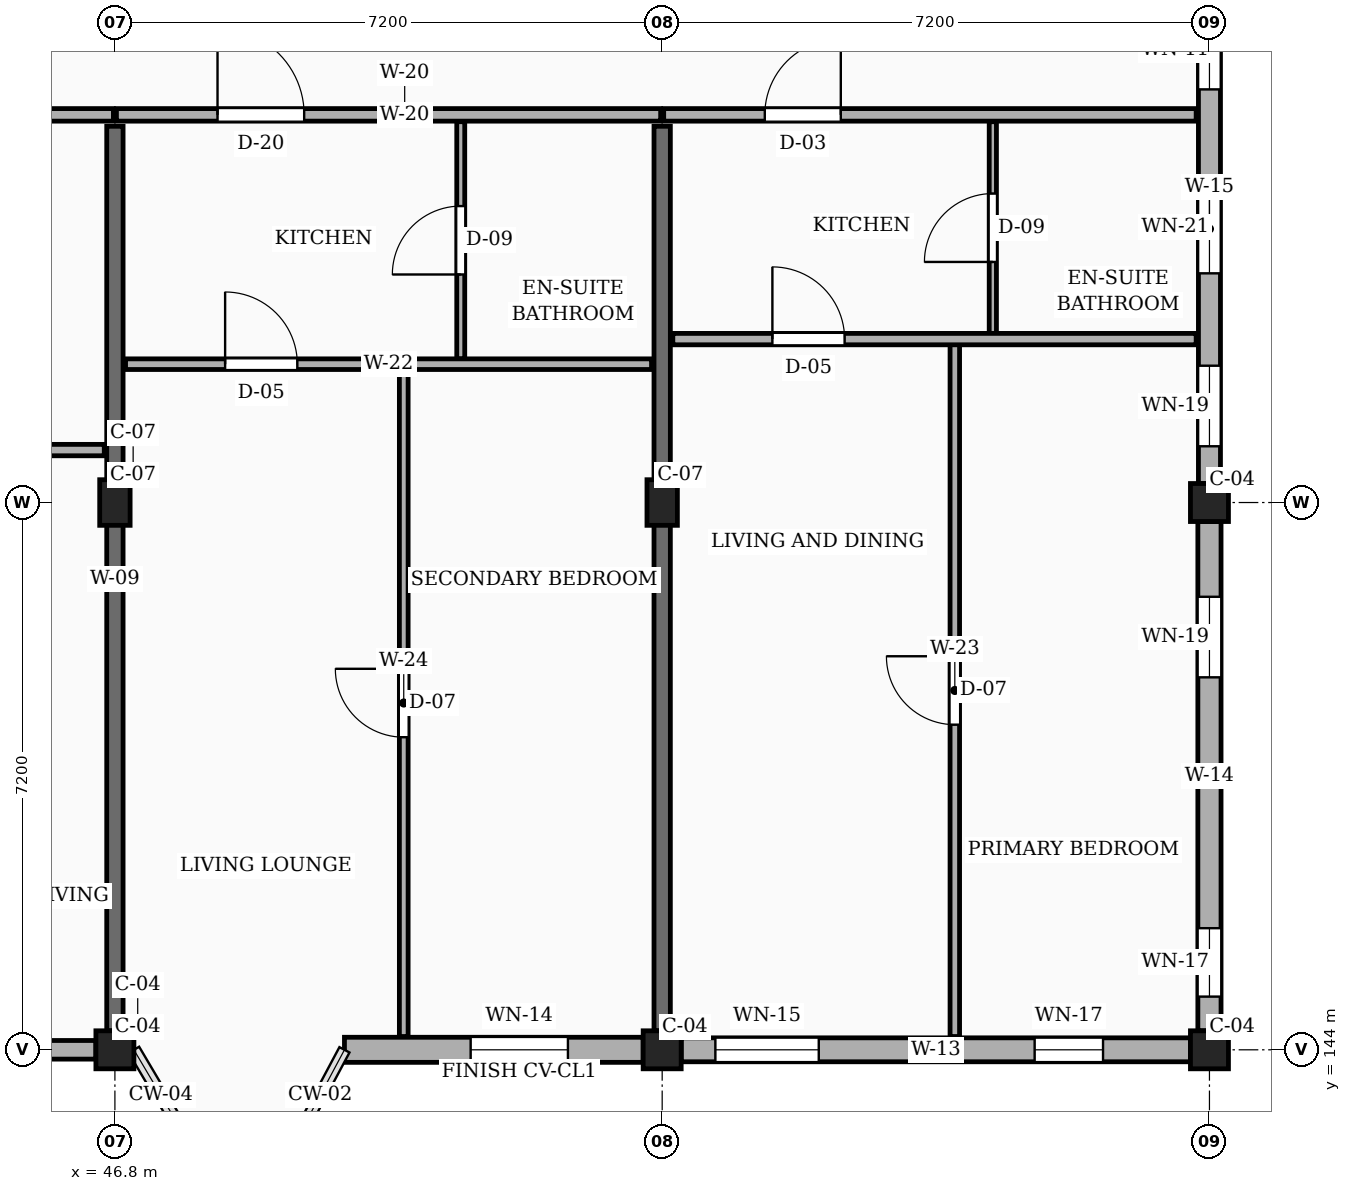
"""IFC4 building model, lengths in metres.
Left out: names, types, materials, properties, quantities, classifications, styles, units other than length and angle.
Written with IfcOpenShell. Run it as: python <this file> out.ifc"""

import sys

from ifc_helpers import new_model, si_unit, direction, frame, frame_2d, origin, origin_2d, place, context, subcontext, project, spatial, rectangle, extrude, element, fill, save


model = new_model("IFC4")
c1 = context("Model", 3, precision=1e-05, world=origin(), true_north=direction((0.0, 1.0)))
c2 = subcontext(c1, "Body", "Model", "MODEL_VIEW")
j1 = project(units=[si_unit("LENGTHUNIT", "METRE"), si_unit("PLANEANGLEUNIT", "RADIAN")], contexts=[c1])
p1 = place(None, origin())
s1 = spatial("IfcSite", under=j1, at=p1, CompositionType="ELEMENT")
p2 = place(p1, origin())
s2 = spatial("IfcBuilding", under=s1, at=p2, CompositionType="ELEMENT")
p3 = place(p2, frame((0.0, 0.0, 29.7)))
s3 = spatial("IfcBuildingStorey", under=s2, at=p3, CompositionType="ELEMENT", Elevation=29.7)
p4 = place(p3, frame((46.8, 144.0, 0.0), z_axis=(0.0, 0.0, 1.0), x_axis=(1.0, 0.0, 0.0)))
e1 = element("IfcColumn", 1, at=p4, inside=s3, PredefinedType="COLUMN", context=c2, shape_type="SweptSolid", body=[
    extrude(rectangle(XDim=0.5, YDim=0.5, at=origin_2d()), origin(), (0.0, 0.0, 1.0), 3.15),
])
p5 = place(p3, frame((46.8, 151.2, 0.0), z_axis=(0.0, 0.0, 1.0), x_axis=(1.0, 0.0, 0.0)))
e2 = element("IfcColumn", 2, at=p5, inside=s3, PredefinedType="COLUMN", context=c2, shape_type="SweptSolid", body=[
    extrude(rectangle(XDim=0.4, YDim=0.6, at=origin_2d()), origin(), (0.0, 0.0, 1.0), 3.15),
])
p6 = place(p3, frame((54.0, 144.0, 0.0), z_axis=(0.0, 0.0, 1.0), x_axis=(1.0, 0.0, 0.0)))
e3 = element("IfcColumn", 3, at=p6, inside=s3, PredefinedType="COLUMN", context=c2, shape_type="SweptSolid", body=[
    extrude(rectangle(XDim=0.5, YDim=0.5, at=origin_2d()), origin(), (0.0, 0.0, 1.0), 3.15),
])
p7 = place(p3, frame((54.0, 151.2, 0.0), z_axis=(0.0, 0.0, 1.0), x_axis=(1.0, 0.0, 0.0)))
e4 = element("IfcColumn", 4, at=p7, inside=s3, PredefinedType="COLUMN", context=c2, shape_type="SweptSolid", body=[
    extrude(rectangle(XDim=0.4, YDim=0.6, at=origin_2d()), origin(), (0.0, 0.0, 1.0), 3.15),
])
for number, where, z_axis, x_axis in (
    (5, (61.2, 144.0, 0.0), (0.0, 0.0, 1.0), (1.0, 0.0, 0.0)),
    (6, (61.2, 151.2, 0.0), (0.0, 0.0, 1.0), (1.0, 0.0, 0.0)),
):
    element("IfcColumn", number, at=place(p3, frame(where, z_axis=z_axis, x_axis=x_axis)), inside=s3, PredefinedType="COLUMN", context=c2, shape_type="SweptSolid", body=[
        extrude(rectangle(XDim=0.5, YDim=0.5, at=origin_2d()), origin(), (0.0, 0.0, 1.0), 3.15),
    ])
for number, where, z_axis, x_axis in (
    (7, (46.8, 144.25, 0.0), (0.0, 0.0, 1.0), (0.0, 1.0, 0.0)),
    (8, (54.0, 144.25, 0.0), (0.0, 0.0, 1.0), (0.0, 1.0, 0.0)),
):
    element("IfcWall", number, at=place(p3, frame(where, z_axis=z_axis, x_axis=x_axis)), inside=s3, PredefinedType="SOLIDWALL", context=c2, shape_type="SweptSolid", body=[
        extrude(rectangle(XDim=11.9, YDim=0.215, at=frame_2d((5.95, 0.0))), origin(), (0.0, 0.0, 1.0), 2.185),
    ])
p8 = place(p3, frame((39.85, 144.0, 0.0), z_axis=(0.0, 0.0, 1.0), x_axis=(1.0, 0.0, 0.0)))
e9 = element("IfcWall", 9, at=p8, inside=s3, PredefinedType="SOLIDWALL", context=c2, shape_type="SweptSolid", body=[
    extrude(rectangle(XDim=6.7, YDim=0.245, at=frame_2d((3.35, 0.0))), origin(), (0.0, 0.0, 1.0), 2.455),
])
p9 = place(p8, frame((0.45, 0.0, 0.78)))
e10 = element("IfcOpeningElement", 10, at=p9, cuts=e9, PredefinedType="OPENING", context=c2, shape_type="SweptSolid", body=[
    extrude(rectangle(XDim=1.12, YDim=1.26, at=frame_2d((0.56, 0.63))), frame((0.0, 0.133, 0.0), z_axis=(0.0, -1.0, 0.0), x_axis=(1.0, 0.0, 0.0)), (0.0, 0.0, 1.0), 0.265),
])
p10 = place(p8, frame((4.65, 0.0, 0.78)))
e11 = element("IfcOpeningElement", 11, at=p10, cuts=e9, PredefinedType="OPENING", context=c2, shape_type="SweptSolid", body=[
    extrude(rectangle(XDim=1.28, YDim=1.26, at=frame_2d((0.64, 0.63))), frame((0.0, 0.133, 0.0), z_axis=(0.0, -1.0, 0.0), x_axis=(1.0, 0.0, 0.0)), (0.0, 0.0, 1.0), 0.265),
])
p11 = place(p3, frame((49.82, 144.0, 0.0), z_axis=(0.0, 0.0, 1.0), x_axis=(1.0, 0.0, 0.0)))
e12 = element("IfcWall", 12, at=p11, inside=s3, PredefinedType="SOLIDWALL", context=c2, shape_type="SweptSolid", body=[
    extrude(rectangle(XDim=3.93, YDim=0.33, at=frame_2d((1.965, 0.0))), origin(), (0.0, 0.0, 1.0), 2.455),
])
p12 = place(p11, frame((1.66, 0.0, 0.78)))
e13 = element("IfcOpeningElement", 13, at=p12, cuts=e12, PredefinedType="OPENING", context=c2, shape_type="SweptSolid", body=[
    extrude(rectangle(XDim=1.28, YDim=1.26, at=frame_2d((0.64, 0.63))), frame((0.0, 0.175, 0.0), z_axis=(0.0, -1.0, 0.0), x_axis=(1.0, 0.0, 0.0)), (0.0, 0.0, 1.0), 0.35),
])
p13 = place(p3, frame((54.25, 144.0, 0.0), z_axis=(0.0, 0.0, 1.0), x_axis=(1.0, 0.0, 0.0)))
e14 = element("IfcWall", 14, at=p13, inside=s3, PredefinedType="SOLIDWALL", context=c2, shape_type="SweptSolid", body=[
    extrude(rectangle(XDim=6.7, YDim=0.315, at=frame_2d((3.35, 0.0))), origin(), (0.0, 0.0, 1.0), 2.455),
])
p14 = place(p13, frame((0.45, 0.0, 0.78)))
e15 = element("IfcOpeningElement", 15, at=p14, cuts=e14, PredefinedType="OPENING", context=c2, shape_type="SweptSolid", body=[
    extrude(rectangle(XDim=1.36, YDim=1.26, at=frame_2d((0.68, 0.63))), frame((0.0, 0.167, 0.0), z_axis=(0.0, -1.0, 0.0), x_axis=(1.0, 0.0, 0.0)), (0.0, 0.0, 1.0), 0.335),
])
p15 = place(p13, frame((4.65, 0.0, 0.78)))
e16 = element("IfcOpeningElement", 16, at=p15, cuts=e14, PredefinedType="OPENING", context=c2, shape_type="SweptSolid", body=[
    extrude(rectangle(XDim=0.9, YDim=1.36, at=frame_2d((0.45, 0.68))), frame((0.0, 0.167, 0.0), z_axis=(0.0, -1.0, 0.0), x_axis=(1.0, 0.0, 0.0)), (0.0, 0.0, 1.0), 0.335),
])
p16 = place(p3, frame((61.2, 144.25, 0.0), z_axis=(0.0, 0.0, 1.0), x_axis=(0.0, 1.0, 0.0)))
e17 = element("IfcWall", 17, at=p16, inside=s3, PredefinedType="SOLIDWALL", context=c2, shape_type="SweptSolid", body=[
    extrude(rectangle(XDim=6.7, YDim=0.305, at=frame_2d((3.35, 0.0))), origin(), (0.0, 0.0, 1.0), 2.455),
])
p17 = place(p16, frame((0.45, 0.0, 0.78)))
e18 = element("IfcOpeningElement", 18, at=p17, cuts=e17, PredefinedType="OPENING", context=c2, shape_type="SweptSolid", body=[
    extrude(rectangle(XDim=0.9, YDim=1.36, at=frame_2d((0.45, 0.68))), frame((0.0, 0.163, 0.0), z_axis=(0.0, -1.0, 0.0), x_axis=(1.0, 0.0, 0.0)), (0.0, 0.0, 1.0), 0.325),
])
p18 = place(p16, frame((4.65, 0.0, 0.78)))
e19 = element("IfcOpeningElement", 19, at=p18, cuts=e17, PredefinedType="OPENING", context=c2, shape_type="SweptSolid", body=[
    extrude(rectangle(XDim=1.06, YDim=1.36, at=frame_2d((0.53, 0.68))), frame((0.0, 0.163, 0.0), z_axis=(0.0, -1.0, 0.0), x_axis=(1.0, 0.0, 0.0)), (0.0, 0.0, 1.0), 0.325),
])
p19 = place(p3, frame((61.2, 151.45, 0.0), z_axis=(0.0, 0.0, 1.0), x_axis=(0.0, 1.0, 0.0)))
e20 = element("IfcWall", 20, at=p19, inside=s3, PredefinedType="SOLIDWALL", context=c2, shape_type="SweptSolid", body=[
    extrude(rectangle(XDim=6.7, YDim=0.29, at=frame_2d((3.35, 0.0))), origin(), (0.0, 0.0, 1.0), 2.455),
])
p20 = place(p19, frame((0.49, 0.0, 0.78)))
e21 = element("IfcOpeningElement", 21, at=p20, cuts=e20, PredefinedType="OPENING", context=c2, shape_type="SweptSolid", body=[
    extrude(rectangle(XDim=1.06, YDim=1.36, at=frame_2d((0.53, 0.68))), frame((0.0, 0.155, 0.0), z_axis=(0.0, -1.0, 0.0), x_axis=(1.0, 0.0, 0.0)), (0.0, 0.0, 1.0), 0.31),
])
p21 = place(p19, frame((2.765, 0.0, 0.78)))
e22 = element("IfcOpeningElement", 22, at=p21, cuts=e20, PredefinedType="OPENING", context=c2, shape_type="SweptSolid", body=[
    extrude(rectangle(XDim=1.22, YDim=1.36, at=frame_2d((0.61, 0.68))), frame((0.0, 0.155, 0.0), z_axis=(0.0, -1.0, 0.0), x_axis=(1.0, 0.0, 0.0)), (0.0, 0.0, 1.0), 0.31),
])
p22 = place(p19, frame((5.185, 0.0, 0.78)))
e23 = element("IfcOpeningElement", 23, at=p22, cuts=e20, PredefinedType="OPENING", context=c2, shape_type="SweptSolid", body=[
    extrude(rectangle(XDim=1.04, YDim=1.26, at=frame_2d((0.52, 0.63))), frame((0.0, 0.155, 0.0), z_axis=(0.0, -1.0, 0.0), x_axis=(1.0, 0.0, 0.0)), (0.0, 0.0, 1.0), 0.31),
])
p23 = place(p3, frame((39.62, 156.3, 0.0), z_axis=(0.0, 0.0, 1.0), x_axis=(1.0, 0.0, 0.0)))
e24 = element("IfcWall", 24, at=p23, inside=s3, PredefinedType="PARTITIONING", context=c2, shape_type="SweptSolid", body=[
    extrude(rectangle(XDim=7.16, YDim=0.165, at=frame_2d((3.58, 0.0))), origin(), (0.0, 0.0, 1.0), 2.32),
])
p24 = place(p23, frame((4.78, 0.0, 0.0)))
e25 = element("IfcOpeningElement", 25, at=p24, cuts=e24, PredefinedType="OPENING", context=c2, shape_type="SweptSolid", body=[
    extrude(rectangle(XDim=0.94, YDim=2.12, at=frame_2d((0.47, 1.06))), frame((0.0, 0.093, 0.0), z_axis=(0.0, -1.0, 0.0), x_axis=(1.0, 0.0, 0.0)), (0.0, 0.0, 1.0), 0.185),
])
p25 = place(p3, frame((46.82, 156.3, 0.0), z_axis=(0.0, 0.0, 1.0), x_axis=(1.0, 0.0, 0.0)))
e26 = element("IfcWall", 26, at=p25, inside=s3, PredefinedType="PARTITIONING", context=c2, shape_type="SweptSolid", body=[
    extrude(rectangle(XDim=7.16, YDim=0.165, at=frame_2d((3.58, 0.0))), origin(), (0.0, 0.0, 1.0), 2.32),
])
p26 = place(p25, frame((1.33, 0.0, 0.0)))
e27 = element("IfcOpeningElement", 27, at=p26, cuts=e26, PredefinedType="OPENING", context=c2, shape_type="SweptSolid", body=[
    extrude(rectangle(XDim=1.14, YDim=2.18, at=frame_2d((0.57, 1.09))), frame((0.0, 0.093, 0.0), z_axis=(0.0, -1.0, 0.0), x_axis=(1.0, 0.0, 0.0)), (0.0, 0.0, 1.0), 0.185),
])
p27 = place(p3, frame((54.02, 156.3, 0.0), z_axis=(0.0, 0.0, 1.0), x_axis=(1.0, 0.0, 0.0)))
e28 = element("IfcWall", 28, at=p27, inside=s3, PredefinedType="PARTITIONING", context=c2, shape_type="SweptSolid", body=[
    extrude(rectangle(XDim=7.005, YDim=0.165, at=frame_2d((3.502, 0.0))), origin(), (0.0, 0.0, 1.0), 2.32),
])
p28 = place(p27, frame((1.33, 0.0, 0.0)))
e29 = element("IfcOpeningElement", 29, at=p28, cuts=e28, PredefinedType="OPENING", context=c2, shape_type="SweptSolid", body=[
    extrude(rectangle(XDim=1.0, YDim=2.15, at=frame_2d((0.5, 1.075))), frame((0.0, 0.093, 0.0), z_axis=(0.0, -1.0, 0.0), x_axis=(1.0, 0.0, 0.0)), (0.0, 0.0, 1.0), 0.185),
])
p29 = place(p3, frame((39.74, 151.89, 0.0), z_axis=(0.0, 0.0, 1.0), x_axis=(1.0, 0.0, 0.0)))
e30 = element("IfcWall", 30, at=p29, inside=s3, PredefinedType="PARTITIONING", context=c2, shape_type="SweptSolid", body=[
    extrude(rectangle(XDim=6.92, YDim=0.15, at=frame_2d((3.46, 0.0))), origin(), (0.0, 0.0, 1.0), 2.32),
])
p30 = place(p29, frame((4.66, 0.0, 0.0)))
e31 = element("IfcOpeningElement", 31, at=p30, cuts=e30, PredefinedType="OPENING", context=c2, shape_type="SweptSolid", body=[
    extrude(rectangle(XDim=0.92, YDim=2.1, at=frame_2d((0.46, 1.05))), frame((0.0, 0.085, 0.0), z_axis=(0.0, -1.0, 0.0), x_axis=(1.0, 0.0, 0.0)), (0.0, 0.0, 1.0), 0.17),
])
p31 = place(p3, frame((50.6, 144.175, 0.0), z_axis=(0.0, 0.0, 1.0), x_axis=(0.0, 1.0, 0.0)))
e32 = element("IfcWall", 32, at=p31, inside=s3, PredefinedType="PARTITIONING", context=c2, shape_type="SweptSolid", body=[
    extrude(rectangle(XDim=8.775, YDim=0.115, at=frame_2d((4.387, 0.0))), origin(), (0.0, 0.0, 1.0), 2.32),
])
p32 = place(p31, frame((3.938, 0.0, 0.0)))
e33 = element("IfcOpeningElement", 33, at=p32, cuts=e32, PredefinedType="OPENING", context=c2, shape_type="SweptSolid", body=[
    extrude(rectangle(XDim=0.9, YDim=2.1, at=frame_2d((0.45, 1.05))), frame((0.0, 0.067, 0.0), z_axis=(0.0, -1.0, 0.0), x_axis=(1.0, 0.0, 0.0)), (0.0, 0.0, 1.0), 0.135),
])
p33 = place(p3, frame((51.35, 153.09, 0.0), z_axis=(0.0, 0.0, 1.0), x_axis=(0.0, 1.0, 0.0)))
e34 = element("IfcWall", 34, at=p33, inside=s3, PredefinedType="PARTITIONING", context=c2, shape_type="SweptSolid", body=[
    extrude(rectangle(XDim=3.12, YDim=0.105, at=frame_2d((1.56, 0.0))), origin(), (0.0, 0.0, 1.0), 2.32),
])
p34 = place(p33, frame((1.11, 0.0, 0.0)))
e35 = element("IfcOpeningElement", 35, at=p34, cuts=e34, PredefinedType="OPENING", context=c2, shape_type="SweptSolid", body=[
    extrude(rectangle(XDim=0.9, YDim=2.05, at=frame_2d((0.45, 1.025))), frame((0.0, 0.062, 0.0), z_axis=(0.0, -1.0, 0.0), x_axis=(1.0, 0.0, 0.0)), (0.0, 0.0, 1.0), 0.125),
])
p35 = place(p3, frame((46.94, 153.02, 0.0), z_axis=(0.0, 0.0, 1.0), x_axis=(1.0, 0.0, 0.0)))
e36 = element("IfcWall", 36, at=p35, inside=s3, PredefinedType="PARTITIONING", context=c2, shape_type="SweptSolid", body=[
    extrude(rectangle(XDim=6.92, YDim=0.14, at=frame_2d((3.46, 0.0))), origin(), (0.0, 0.0, 1.0), 2.32),
])
p36 = place(p35, frame((1.31, 0.0, 0.0)))
e37 = element("IfcOpeningElement", 37, at=p36, cuts=e36, PredefinedType="OPENING", context=c2, shape_type="SweptSolid", body=[
    extrude(rectangle(XDim=0.95, YDim=2.1, at=frame_2d((0.475, 1.05))), frame((0.0, 0.08, 0.0), z_axis=(0.0, -1.0, 0.0), x_axis=(1.0, 0.0, 0.0)), (0.0, 0.0, 1.0), 0.16),
])
p37 = place(p3, frame((57.85, 144.175, 0.0), z_axis=(0.0, 0.0, 1.0), x_axis=(0.0, 1.0, 0.0)))
e38 = element("IfcWall", 38, at=p37, inside=s3, PredefinedType="PARTITIONING", context=c2, shape_type="SweptSolid", body=[
    extrude(rectangle(XDim=9.105, YDim=0.125, at=frame_2d((4.552, 0.0))), origin(), (0.0, 0.0, 1.0), 2.32),
])
p38 = place(p37, frame((4.103, 0.0, 0.0)))
e39 = element("IfcOpeningElement", 39, at=p38, cuts=e38, PredefinedType="OPENING", context=c2, shape_type="SweptSolid", body=[
    extrude(rectangle(XDim=0.9, YDim=2.1, at=frame_2d((0.45, 1.05))), frame((0.0, 0.073, 0.0), z_axis=(0.0, -1.0, 0.0), x_axis=(1.0, 0.0, 0.0)), (0.0, 0.0, 1.0), 0.145),
])
p39 = place(p3, frame((58.35, 153.42, 0.0), z_axis=(0.0, 0.0, 1.0), x_axis=(0.0, 1.0, 0.0)))
e40 = element("IfcWall", 40, at=p39, inside=s3, PredefinedType="PARTITIONING", context=c2, shape_type="SweptSolid", body=[
    extrude(rectangle(XDim=2.79, YDim=0.095, at=frame_2d((1.395, 0.0))), origin(), (0.0, 0.0, 1.0), 2.32),
])
p40 = place(p39, frame((0.945, 0.0, 0.0)))
e41 = element("IfcOpeningElement", 41, at=p40, cuts=e40, PredefinedType="OPENING", context=c2, shape_type="SweptSolid", body=[
    extrude(rectangle(XDim=0.9, YDim=2.05, at=frame_2d((0.45, 1.025))), frame((0.0, 0.058, 0.0), z_axis=(0.0, -1.0, 0.0), x_axis=(1.0, 0.0, 0.0)), (0.0, 0.0, 1.0), 0.115),
])
p41 = place(p3, frame((54.14, 153.35, 0.0), z_axis=(0.0, 0.0, 1.0), x_axis=(1.0, 0.0, 0.0)))
e42 = element("IfcWall", 42, at=p41, inside=s3, PredefinedType="PARTITIONING", context=c2, shape_type="SweptSolid", body=[
    extrude(rectangle(XDim=6.885, YDim=0.15, at=frame_2d((3.442, 0.0))), origin(), (0.0, 0.0, 1.0), 2.32),
])
p42 = place(p41, frame((1.31, 0.0, 0.0)))
e43 = element("IfcOpeningElement", 43, at=p42, cuts=e42, PredefinedType="OPENING", context=c2, shape_type="SweptSolid", body=[
    extrude(rectangle(XDim=0.95, YDim=2.1, at=frame_2d((0.475, 1.05))), frame((0.0, 0.085, 0.0), z_axis=(0.0, -1.0, 0.0), x_axis=(1.0, 0.0, 0.0)), (0.0, 0.0, 1.0), 0.17),
])
p43 = place(p12, origin())
e44 = element("IfcWindow", 44, at=p43, inside=s3, PartitioningType="SINGLE_PANEL", PredefinedType="WINDOW", context=c2, shape_type="SweptSolid", body=[
    extrude(rectangle(XDim=1.28, YDim=1.26, at=frame_2d((0.64, 0.63))), frame((0.0, 0.03, 0.0), z_axis=(0.0, -1.0, 0.0), x_axis=(1.0, 0.0, 0.0)), (0.0, 0.0, 1.0), 0.06),
])
fill(e13, e44)
p44 = place(p14, origin())
e45 = element("IfcWindow", 45, at=p44, inside=s3, PartitioningType="SINGLE_PANEL", PredefinedType="WINDOW", context=c2, shape_type="SweptSolid", body=[
    extrude(rectangle(XDim=1.36, YDim=1.26, at=frame_2d((0.68, 0.63))), frame((0.0, 0.03, 0.0), z_axis=(0.0, -1.0, 0.0), x_axis=(1.0, 0.0, 0.0)), (0.0, 0.0, 1.0), 0.06),
])
fill(e15, e45)
p45 = place(p15, origin())
e46 = element("IfcWindow", 46, at=p45, inside=s3, PartitioningType="SINGLE_PANEL", PredefinedType="WINDOW", context=c2, shape_type="SweptSolid", body=[
    extrude(rectangle(XDim=0.9, YDim=1.36, at=frame_2d((0.45, 0.68))), frame((0.0, 0.03, 0.0), z_axis=(0.0, -1.0, 0.0), x_axis=(1.0, 0.0, 0.0)), (0.0, 0.0, 1.0), 0.06),
])
fill(e16, e46)
p46 = place(p17, origin())
e47 = element("IfcWindow", 47, at=p46, inside=s3, PartitioningType="SINGLE_PANEL", PredefinedType="WINDOW", context=c2, shape_type="SweptSolid", body=[
    extrude(rectangle(XDim=0.9, YDim=1.36, at=frame_2d((0.45, 0.68))), frame((0.0, 0.03, 0.0), z_axis=(0.0, -1.0, 0.0), x_axis=(1.0, 0.0, 0.0)), (0.0, 0.0, 1.0), 0.06),
])
fill(e18, e47)
p47 = place(p18, origin())
e48 = element("IfcWindow", 48, at=p47, inside=s3, PartitioningType="SINGLE_PANEL", PredefinedType="WINDOW", context=c2, shape_type="SweptSolid", body=[
    extrude(rectangle(XDim=1.06, YDim=1.36, at=frame_2d((0.53, 0.68))), frame((0.0, 0.03, 0.0), z_axis=(0.0, -1.0, 0.0), x_axis=(1.0, 0.0, 0.0)), (0.0, 0.0, 1.0), 0.06),
])
fill(e19, e48)
p48 = place(p20, origin())
e49 = element("IfcWindow", 49, at=p48, inside=s3, PartitioningType="SINGLE_PANEL", PredefinedType="WINDOW", context=c2, shape_type="SweptSolid", body=[
    extrude(rectangle(XDim=1.06, YDim=1.36, at=frame_2d((0.53, 0.68))), frame((0.0, 0.03, 0.0), z_axis=(0.0, -1.0, 0.0), x_axis=(1.0, 0.0, 0.0)), (0.0, 0.0, 1.0), 0.06),
])
fill(e21, e49)
p49 = place(p21, origin())
e50 = element("IfcWindow", 50, at=p49, inside=s3, PartitioningType="SINGLE_PANEL", PredefinedType="WINDOW", context=c2, shape_type="SweptSolid", body=[
    extrude(rectangle(XDim=1.22, YDim=1.36, at=frame_2d((0.61, 0.68))), frame((0.0, 0.03, 0.0), z_axis=(0.0, -1.0, 0.0), x_axis=(1.0, 0.0, 0.0)), (0.0, 0.0, 1.0), 0.06),
])
fill(e22, e50)
p50 = place(p22, origin())
e51 = element("IfcWindow", 51, at=p50, inside=s3, PartitioningType="SINGLE_PANEL", PredefinedType="WINDOW", context=c2, shape_type="SweptSolid", body=[
    extrude(rectangle(XDim=1.04, YDim=1.26, at=frame_2d((0.52, 0.63))), frame((0.0, 0.03, 0.0), z_axis=(0.0, -1.0, 0.0), x_axis=(1.0, 0.0, 0.0)), (0.0, 0.0, 1.0), 0.06),
])
fill(e23, e51)
p51 = place(p26, origin())
e52 = element("IfcDoor", 52, at=p51, inside=s3, OperationType="SINGLE_SWING_LEFT", PredefinedType="DOOR", context=c2, shape_type="SweptSolid", body=[
    extrude(rectangle(XDim=1.14, YDim=2.18, at=frame_2d((0.57, 1.09))), frame((0.0, 0.025, 0.0), z_axis=(0.0, -1.0, 0.0), x_axis=(1.0, 0.0, 0.0)), (0.0, 0.0, 1.0), 0.05),
])
fill(e27, e52)
p52 = place(p28, origin())
e53 = element("IfcDoor", 53, at=p52, inside=s3, OperationType="SINGLE_SWING_RIGHT", PredefinedType="DOOR", context=c2, shape_type="SweptSolid", body=[
    extrude(rectangle(XDim=1.0, YDim=2.15, at=frame_2d((0.5, 1.075))), frame((0.0, 0.025, 0.0), z_axis=(0.0, -1.0, 0.0), x_axis=(1.0, 0.0, 0.0)), (0.0, 0.0, 1.0), 0.05),
])
fill(e29, e53)
p53 = place(p32, origin())
e54 = element("IfcDoor", 54, at=p53, inside=s3, OperationType="SINGLE_SWING_RIGHT", PredefinedType="DOOR", context=c2, shape_type="SweptSolid", body=[
    extrude(rectangle(XDim=0.9, YDim=2.1, at=frame_2d((0.45, 1.05))), frame((0.0, 0.025, 0.0), z_axis=(0.0, -1.0, 0.0), x_axis=(1.0, 0.0, 0.0)), (0.0, 0.0, 1.0), 0.05),
])
fill(e33, e54)
p54 = place(p34, origin())
e55 = element("IfcDoor", 55, at=p54, inside=s3, OperationType="SINGLE_SWING_LEFT", PredefinedType="DOOR", context=c2, shape_type="SweptSolid", body=[
    extrude(rectangle(XDim=0.9, YDim=2.05, at=frame_2d((0.45, 1.025))), frame((0.0, 0.025, 0.0), z_axis=(0.0, -1.0, 0.0), x_axis=(1.0, 0.0, 0.0)), (0.0, 0.0, 1.0), 0.05),
])
fill(e35, e55)
p55 = place(p36, origin())
e56 = element("IfcDoor", 56, at=p55, inside=s3, OperationType="SINGLE_SWING_LEFT", PredefinedType="DOOR", context=c2, shape_type="SweptSolid", body=[
    extrude(rectangle(XDim=0.95, YDim=2.1, at=frame_2d((0.475, 1.05))), frame((0.0, 0.025, 0.0), z_axis=(0.0, -1.0, 0.0), x_axis=(1.0, 0.0, 0.0)), (0.0, 0.0, 1.0), 0.05),
])
fill(e37, e56)
p56 = place(p38, origin())
e57 = element("IfcDoor", 57, at=p56, inside=s3, OperationType="SINGLE_SWING_RIGHT", PredefinedType="DOOR", context=c2, shape_type="SweptSolid", body=[
    extrude(rectangle(XDim=0.9, YDim=2.1, at=frame_2d((0.45, 1.05))), frame((0.0, 0.025, 0.0), z_axis=(0.0, -1.0, 0.0), x_axis=(1.0, 0.0, 0.0)), (0.0, 0.0, 1.0), 0.05),
])
fill(e39, e57)
p57 = place(p40, origin())
e58 = element("IfcDoor", 58, at=p57, inside=s3, OperationType="SINGLE_SWING_LEFT", PredefinedType="DOOR", context=c2, shape_type="SweptSolid", body=[
    extrude(rectangle(XDim=0.9, YDim=2.05, at=frame_2d((0.45, 1.025))), frame((0.0, 0.025, 0.0), z_axis=(0.0, -1.0, 0.0), x_axis=(1.0, 0.0, 0.0)), (0.0, 0.0, 1.0), 0.05),
])
fill(e41, e58)
p58 = place(p42, origin())
e59 = element("IfcDoor", 59, at=p58, inside=s3, OperationType="SINGLE_SWING_LEFT", PredefinedType="DOOR", context=c2, shape_type="SweptSolid", body=[
    extrude(rectangle(XDim=0.95, YDim=2.1, at=frame_2d((0.475, 1.05))), frame((0.0, 0.025, 0.0), z_axis=(0.0, -1.0, 0.0), x_axis=(1.0, 0.0, 0.0)), (0.0, 0.0, 1.0), 0.05),
])
fill(e43, e59)
save(model, sys.argv[1])
